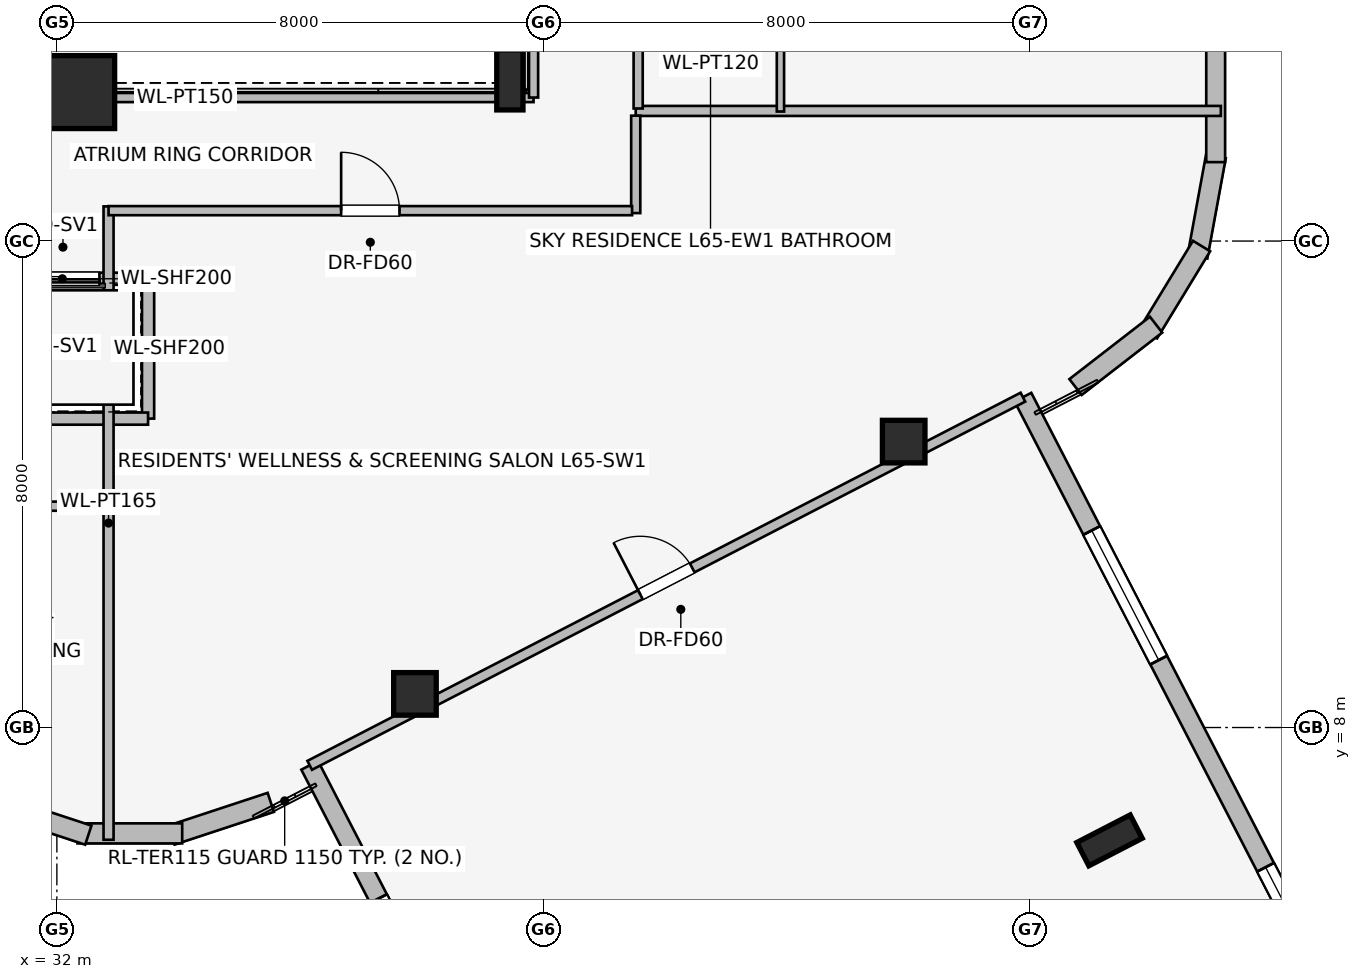
"""IFC4 building model, lengths in metres.
Left out: names, types, materials, properties, quantities, classifications, styles, units other than length and angle.
Written with IfcOpenShell. Run it as: python <this file> out.ifc"""

import sys

from ifc_helpers import new_model, si_unit, direction, frame, frame_2d, origin, origin_2d, place, context, subcontext, project, spatial, rectangle, i_section, extrude, element, fill, save


model = new_model("IFC4")
c1 = context("Model", 3, precision=1e-05, world=origin(), true_north=direction((0.0, 1.0)))
c2 = subcontext(c1, "Body", "Model", "MODEL_VIEW")
j1 = project(units=[si_unit("LENGTHUNIT", "METRE"), si_unit("PLANEANGLEUNIT", "RADIAN")], contexts=[c1])
p1 = place(None, origin())
s1 = spatial("IfcSite", under=j1, at=p1, CompositionType="ELEMENT")
p2 = place(p1, origin())
s2 = spatial("IfcBuilding", under=s1, at=p2, CompositionType="ELEMENT")
p3 = place(p2, frame((0.0, 0.0, 238.35)))
s3 = spatial("IfcBuildingStorey", under=s2, at=p3, CompositionType="ELEMENT", Elevation=238.35)
p4 = place(p3, frame((32.35, 18.45, 0.0), z_axis=(0.0, 0.0, 1.0), x_axis=(1.0, 0.0, 0.0)))
e1 = element("IfcColumn", 1, at=p4, inside=s3, PredefinedType="COLUMN", context=c2, shape_type="SweptSolid", body=[
    extrude(rectangle(XDim=1.2, YDim=1.2, at=origin_2d()), origin(), (0.0, 0.0, 1.0), 3.55),
])
for number, where, z_axis, x_axis in (
    (2, (37.889, 8.553, 0.0), (0.0, 0.0, 1.0), (1.0, 0.0, 0.0)),
    (3, (45.927, 12.702, 0.0), (0.0, 0.0, 1.0), (1.0, 0.0, 0.0)),
):
    element("IfcColumn", number, at=place(p3, frame(where, z_axis=z_axis, x_axis=x_axis)), inside=s3, PredefinedType="COLUMN", context=c2, shape_type="SweptSolid", body=[
        extrude(rectangle(XDim=0.7, YDim=0.7, at=origin_2d()), origin(), (0.0, 0.0, 1.0), 3.55),
    ])
for number, where, z_axis, x_axis in (
    (4, (39.45, 18.65, 0.0), (0.0, 0.0, 1.0), (1.0, 0.0, 0.0)),
    (5, (49.312, 6.144, 0.0), (0.0, 0.0, 1.0), (0.459, -0.889, 0.0)),
):
    element("IfcColumn", number, at=place(p3, frame(where, z_axis=z_axis, x_axis=x_axis)), inside=s3, PredefinedType="COLUMN", context=c2, shape_type="SweptSolid", body=[
        extrude(i_section(OverallWidth=0.431, OverallDepth=0.987, WebThickness=0.034, FlangeThickness=0.062, at=origin_2d()), origin(), (0.0, 0.0, 1.0), 3.55),
    ])
p5 = place(p3, frame((35.518, 6.769, 0.0), z_axis=(0.0, 0.0, 1.0), x_axis=(-0.949713440491, -0.313120393699, 0.0)))
e6 = element("IfcWall", 6, at=p5, inside=s3, PredefinedType="STANDARD", context=c2, shape_type="SweptSolid", body=[
    extrude(rectangle(XDim=1.722, YDim=0.33, at=frame_2d((0.861, 0.0))), origin(), (0.0, 0.0, 1.0), 3.26),
])
p6 = place(p3, frame((34.061, 6.259, 0.0), z_axis=(0.0, 0.0, 1.0), x_axis=(-1.0, 0.0, 0.0)))
e7 = element("IfcWall", 7, at=p6, inside=s3, PredefinedType="STANDARD", context=c2, shape_type="SweptSolid", body=[
    extrude(rectangle(XDim=1.722, YDim=0.33, at=frame_2d((0.861, 0.0))), origin(), (0.0, 0.0, 1.0), 3.26),
])
p7 = place(p3, frame((32.517, 6.23, 0.0), z_axis=(0.0, 0.0, 1.0), x_axis=(-0.949713440491, 0.313120393699, 0.0)))
e8 = element("IfcWall", 8, at=p7, inside=s3, PredefinedType="STANDARD", context=c2, shape_type="SweptSolid", body=[
    extrude(rectangle(XDim=1.722, YDim=0.33, at=frame_2d((0.861, 0.0))), origin(), (0.0, 0.0, 1.0), 3.26),
])
p8 = place(p3, frame((45.241, -10.216, 0.0), z_axis=(0.0, 0.0, 1.0), x_axis=(-0.45873211625, 0.888574614493, 0.0)))
e9 = element("IfcWall", 9, at=p8, inside=s3, PredefinedType="STANDARD", context=c2, shape_type="SweptSolid", body=[
    extrude(rectangle(XDim=19.8, YDim=0.31, at=frame_2d((9.9, 0.0))), origin(), (0.0, 0.0, 1.0), 3.26),
])
p9 = place(p8, frame((2.467, 0.0, 0.75)))
e10 = element("IfcOpeningElement", 10, at=p9, cuts=e9, PredefinedType="OPENING", context=c2, shape_type="SweptSolid", body=[
    extrude(rectangle(XDim=2.4, YDim=1.6, at=frame_2d((1.2, 0.8))), frame((0.0, 0.165, 0.0), z_axis=(0.0, -1.0, 0.0), x_axis=(1.0, 0.0, 0.0)), (0.0, 0.0, 1.0), 0.33),
])
p10 = place(p8, frame((8.7, 0.0, 0.75)))
e11 = element("IfcOpeningElement", 11, at=p10, cuts=e9, PredefinedType="OPENING", context=c2, shape_type="SweptSolid", body=[
    extrude(rectangle(XDim=2.4, YDim=1.6, at=frame_2d((1.2, 0.8))), frame((0.0, 0.165, 0.0), z_axis=(0.0, -1.0, 0.0), x_axis=(1.0, 0.0, 0.0)), (0.0, 0.0, 1.0), 0.33),
])
p11 = place(p8, frame((14.934, 0.0, 0.75)))
e12 = element("IfcOpeningElement", 12, at=p11, cuts=e9, PredefinedType="OPENING", context=c2, shape_type="SweptSolid", body=[
    extrude(rectangle(XDim=2.4, YDim=1.6, at=frame_2d((1.2, 0.8))), frame((0.0, 0.165, 0.0), z_axis=(0.0, -1.0, 0.0), x_axis=(1.0, 0.0, 0.0)), (0.0, 0.0, 1.0), 0.33),
])
p12 = place(p3, frame((47.888, 13.433, 0.0), z_axis=(0.0, 0.0, 1.0), x_axis=(0.458693173014, -0.888594718097, 0.0)))
e13 = element("IfcWall", 13, at=p12, inside=s3, PredefinedType="STANDARD", context=c2, shape_type="SweptSolid", body=[
    extrude(rectangle(XDim=19.8, YDim=0.31, at=frame_2d((9.9, 0.0))), origin(), (0.0, 0.0, 1.0), 3.26),
])
p13 = place(p12, frame((2.467, 0.0, 0.75)))
e14 = element("IfcOpeningElement", 14, at=p13, cuts=e13, PredefinedType="OPENING", context=c2, shape_type="SweptSolid", body=[
    extrude(rectangle(XDim=2.4, YDim=1.6, at=frame_2d((1.2, 0.8))), frame((0.0, 0.165, 0.0), z_axis=(0.0, -1.0, 0.0), x_axis=(1.0, 0.0, 0.0)), (0.0, 0.0, 1.0), 0.33),
])
p14 = place(p12, frame((8.7, 0.0, 0.75)))
e15 = element("IfcOpeningElement", 15, at=p14, cuts=e13, PredefinedType="OPENING", context=c2, shape_type="SweptSolid", body=[
    extrude(rectangle(XDim=2.4, YDim=1.6, at=frame_2d((1.2, 0.8))), frame((0.0, 0.165, 0.0), z_axis=(0.0, -1.0, 0.0), x_axis=(1.0, 0.0, 0.0)), (0.0, 0.0, 1.0), 0.33),
])
p15 = place(p12, frame((14.933, 0.0, 0.75)))
e16 = element("IfcOpeningElement", 16, at=p15, cuts=e13, PredefinedType="OPENING", context=c2, shape_type="SweptSolid", body=[
    extrude(rectangle(XDim=2.4, YDim=1.6, at=frame_2d((1.2, 0.8))), frame((0.0, 0.165, 0.0), z_axis=(0.0, -1.0, 0.0), x_axis=(1.0, 0.0, 0.0)), (0.0, 0.0, 1.0), 0.33),
])
p16 = place(p3, frame((51.062, 17.392, 0.0), z_axis=(0.0, 0.0, 1.0), x_axis=(-0.180691763044, -0.983539773862, 0.0)))
e17 = element("IfcWall", 17, at=p16, inside=s3, PredefinedType="STANDARD", context=c2, shape_type="SweptSolid", body=[
    extrude(rectangle(XDim=1.677, YDim=0.33, at=frame_2d((0.838, 0.0))), origin(), (0.0, 0.0, 1.0), 3.26),
])
p17 = place(p3, frame((50.826, 15.918, 0.0), z_axis=(0.0, 0.0, 1.0), x_axis=(-0.520325409202, -0.853968072318, 0.0)))
e18 = element("IfcWall", 18, at=p17, inside=s3, PredefinedType="STANDARD", context=c2, shape_type="SweptSolid", body=[
    extrude(rectangle(XDim=1.678, YDim=0.33, at=frame_2d((0.839, 0.0))), origin(), (0.0, 0.0, 1.0), 3.26),
])
p18 = place(p3, frame((50.078, 14.625, 0.0), z_axis=(0.0, 0.0, 1.0), x_axis=(-0.790691856293, -0.61221433207, 0.0)))
e19 = element("IfcWall", 19, at=p18, inside=s3, PredefinedType="STANDARD", context=c2, shape_type="SweptSolid", body=[
    extrude(rectangle(XDim=1.676, YDim=0.33, at=frame_2d((0.838, 0.0))), origin(), (0.0, 0.0, 1.0), 3.26),
])
p19 = place(p3, frame((51.058, 30.702, 0.0), z_axis=(0.0, 0.0, 1.0), x_axis=(0.0, -1.0, 0.0)))
e20 = element("IfcWall", 20, at=p19, inside=s3, PredefinedType="STANDARD", context=c2, shape_type="SweptSolid", body=[
    extrude(rectangle(XDim=13.404, YDim=0.31, at=frame_2d((6.702, 0.0))), origin(), (0.0, 0.0, 1.0), 3.26),
])
p20 = place(p19, frame((3.547, 0.0, 0.75)))
e21 = element("IfcOpeningElement", 21, at=p20, cuts=e20, PredefinedType="OPENING", context=c2, shape_type="SweptSolid", body=[
    extrude(rectangle(XDim=1.05, YDim=1.4, at=frame_2d((0.525, 0.7))), frame((0.0, 0.165, 0.0), z_axis=(0.0, -1.0, 0.0), x_axis=(1.0, 0.0, 0.0)), (0.0, 0.0, 1.0), 0.33),
])
p21 = place(p19, frame((6.26, 0.0, 0.75)))
e22 = element("IfcOpeningElement", 22, at=p21, cuts=e20, PredefinedType="OPENING", context=c2, shape_type="SweptSolid", body=[
    extrude(rectangle(XDim=1.05, YDim=1.4, at=frame_2d((0.525, 0.7))), frame((0.0, 0.165, 0.0), z_axis=(0.0, -1.0, 0.0), x_axis=(1.0, 0.0, 0.0)), (0.0, 0.0, 1.0), 0.33),
])
p22 = place(p19, frame((8.868, 0.0, 0.75)))
e23 = element("IfcOpeningElement", 23, at=p22, cuts=e20, PredefinedType="OPENING", context=c2, shape_type="SweptSolid", body=[
    extrude(rectangle(XDim=1.05, YDim=1.4, at=frame_2d((0.525, 0.7))), frame((0.0, 0.165, 0.0), z_axis=(0.0, -1.0, 0.0), x_axis=(1.0, 0.0, 0.0)), (0.0, 0.0, 1.0), 0.33),
])
p23 = place(p3, frame((33.5, 15.38, 0.0), z_axis=(0.0, 0.0, 1.0), x_axis=(-1.0, 0.0, 0.0)))
e24 = element("IfcWall", 24, at=p23, inside=s3, PredefinedType="PARTITIONING", context=c2, shape_type="SweptSolid", body=[
    extrude(rectangle(XDim=2.82, YDim=0.2, at=frame_2d((1.41, 0.0))), origin(), (0.0, 0.0, 1.0), 3.26),
])
p24 = place(p23, frame((0.8, 0.0, 0.0)))
e25 = element("IfcOpeningElement", 25, at=p24, cuts=e24, PredefinedType="OPENING", context=c2, shape_type="SweptSolid", body=[
    extrude(rectangle(XDim=1.2, YDim=2.2, at=frame_2d((0.6, 1.1))), frame((0.0, 0.11, 0.0), z_axis=(0.0, -1.0, 0.0), x_axis=(1.0, 0.0, 0.0)), (0.0, 0.0, 1.0), 0.22),
])
p25 = place(p3, frame((33.5, 13.08, 0.0), z_axis=(0.0, 0.0, 1.0), x_axis=(0.0, 1.0, 0.0)))
e26 = element("IfcWall", 26, at=p25, inside=s3, PredefinedType="PARTITIONING", context=c2, shape_type="SweptSolid", body=[
    extrude(rectangle(XDim=2.3, YDim=0.2, at=frame_2d((1.15, 0.0))), origin(), (0.0, 0.0, 1.0), 3.26),
])
p26 = place(p3, frame((30.879, 13.08, 0.0), z_axis=(0.0, 0.0, 1.0), x_axis=(1.0, 0.0, 0.0)))
e27 = element("IfcWall", 27, at=p26, inside=s3, PredefinedType="PARTITIONING", context=c2, shape_type="SweptSolid", body=[
    extrude(rectangle(XDim=2.621, YDim=0.2, at=frame_2d((1.311, 0.0))), origin(), (0.0, 0.0, 1.0), 3.26),
])
p27 = place(p3, frame((27.675, 18.36, 0.0), z_axis=(0.0, 0.0, 1.0), x_axis=(1.0, 0.0, 0.0)))
e28 = element("IfcWall", 28, at=p27, inside=s3, PredefinedType="PARTITIONING", context=c2, shape_type="SweptSolid", body=[
    extrude(rectangle(XDim=12.165, YDim=0.15, at=frame_2d((6.083, 0.0))), origin(), (0.0, 0.0, 1.0), 2.401),
])
p28 = place(p3, frame((39.84, 18.36, 0.0), z_axis=(0.0, 0.0, 1.0), x_axis=(0.0, 1.0, 0.0)))
e29 = element("IfcWall", 29, at=p28, inside=s3, PredefinedType="PARTITIONING", context=c2, shape_type="SweptSolid", body=[
    extrude(rectangle(XDim=11.28, YDim=0.15, at=frame_2d((5.64, 0.0))), origin(), (0.0, 0.0, 1.0), 3.26),
])
p29 = place(p3, frame((32.85, 6.154, 0.0), z_axis=(0.0, 0.0, 1.0), x_axis=(0.0, 1.0, 0.0)))
e30 = element("IfcWall", 30, at=p29, inside=s3, PredefinedType="PARTITIONING", context=c2, shape_type="SweptSolid", body=[
    extrude(rectangle(XDim=10.416, YDim=0.165, at=frame_2d((5.208, 0.0))), origin(), (0.0, 0.0, 1.0), 3.26),
])
p30 = place(p3, frame((21.244, 11.64, 0.0), z_axis=(0.0, 0.0, 1.0), x_axis=(1.0, 0.0, 0.0)))
e31 = element("IfcWall", 31, at=p30, inside=s3, PredefinedType="PARTITIONING", context=c2, shape_type="SweptSolid", body=[
    extrude(rectangle(XDim=11.606, YDim=0.15, at=frame_2d((5.803, 0.0))), origin(), (0.0, 0.0, 1.0), 3.26),
])
p31 = place(p30, frame((4.856, 0.0, 0.0)))
e32 = element("IfcOpeningElement", 32, at=p31, cuts=e31, PredefinedType="OPENING", context=c2, shape_type="SweptSolid", body=[
    extrude(rectangle(XDim=0.9, YDim=2.0, at=frame_2d((0.45, 1.0))), frame((0.0, 0.085, 0.0), z_axis=(0.0, -1.0, 0.0), x_axis=(1.0, 0.0, 0.0)), (0.0, 0.0, 1.0), 0.17),
])
p32 = place(p30, frame((8.306, 0.0, 0.0)))
e33 = element("IfcOpeningElement", 33, at=p32, cuts=e31, PredefinedType="OPENING", context=c2, shape_type="SweptSolid", body=[
    extrude(rectangle(XDim=0.9, YDim=2.0, at=frame_2d((0.45, 1.0))), frame((0.0, 0.085, 0.0), z_axis=(0.0, -1.0, 0.0), x_axis=(1.0, 0.0, 0.0)), (0.0, 0.0, 1.0), 0.17),
])
p33 = place(p3, frame((41.52, 18.14, 0.0), z_axis=(0.0, 0.0, 1.0), x_axis=(1.0, 0.0, 0.0)))
e34 = element("IfcWall", 34, at=p33, inside=s3, PredefinedType="PARTITIONING", context=c2, shape_type="SweptSolid", body=[
    extrude(rectangle(XDim=9.623, YDim=0.165, at=frame_2d((4.812, 0.0))), origin(), (0.0, 0.0, 1.0), 3.26),
])
p34 = place(p3, frame((43.9, 18.13, 0.0), z_axis=(0.0, 0.0, 1.0), x_axis=(0.0, 1.0, 0.0)))
e35 = element("IfcWall", 35, at=p34, inside=s3, PredefinedType="PARTITIONING", context=c2, shape_type="SweptSolid", body=[
    extrude(rectangle(XDim=4.389, YDim=0.12, at=frame_2d((2.195, 0.0))), origin(), (0.0, 0.0, 1.0), 3.26),
])
p35 = place(p3, frame((41.56, 18.18, 0.0), z_axis=(0.0, 0.0, 1.0), x_axis=(0.0, 1.0, 0.0)))
e36 = element("IfcWall", 36, at=p35, inside=s3, PredefinedType="PARTITIONING", context=c2, shape_type="SweptSolid", body=[
    extrude(rectangle(XDim=7.199, YDim=0.15, at=frame_2d((3.6, 0.0))), origin(), (0.0, 0.0, 1.0), 3.26),
])
p36 = place(p35, frame((4.37, 0.0, 0.0)))
e37 = element("IfcOpeningElement", 37, at=p36, cuts=e36, PredefinedType="OPENING", context=c2, shape_type="SweptSolid", body=[
    extrude(rectangle(XDim=0.96, YDim=2.0, at=frame_2d((0.48, 1.0))), frame((0.0, 0.085, 0.0), z_axis=(0.0, -1.0, 0.0), x_axis=(1.0, 0.0, 0.0)), (0.0, 0.0, 1.0), 0.17),
])
p37 = place(p3, frame((41.52, 16.46, 0.0), z_axis=(0.0, 0.0, 1.0), x_axis=(0.0, 1.0, 0.0)))
e38 = element("IfcWall", 38, at=p37, inside=s3, PredefinedType="PARTITIONING", context=c2, shape_type="SweptSolid", body=[
    extrude(rectangle(XDim=1.602, YDim=0.15, at=frame_2d((0.801, 0.0))), origin(), (0.0, 0.0, 1.0), 3.26),
])
p38 = place(p3, frame((32.85, 16.5, 0.0), z_axis=(0.0, 0.0, 1.0), x_axis=(1.0, 0.0, 0.0)))
e39 = element("IfcWall", 39, at=p38, inside=s3, PredefinedType="PARTITIONING", context=c2, shape_type="SweptSolid", body=[
    extrude(rectangle(XDim=8.61, YDim=0.15, at=frame_2d((4.305, 0.0))), origin(), (0.0, 0.0, 1.0), 3.26),
])
p39 = place(p38, frame((3.825, 0.0, 0.0)))
e40 = element("IfcOpeningElement", 40, at=p39, cuts=e39, PredefinedType="OPENING", context=c2, shape_type="SweptSolid", body=[
    extrude(rectangle(XDim=0.96, YDim=2.0, at=frame_2d((0.48, 1.0))), frame((0.0, 0.085, 0.0), z_axis=(0.0, -1.0, 0.0), x_axis=(1.0, 0.0, 0.0)), (0.0, 0.0, 1.0), 0.17),
])
p40 = place(p3, frame((36.158, 7.378, 0.0), z_axis=(0.0, 0.0, 1.0), x_axis=(0.88859001822, 0.458702277648, 0.0)))
e41 = element("IfcWall", 41, at=p40, inside=s3, PredefinedType="PARTITIONING", context=c2, shape_type="SweptSolid", body=[
    extrude(rectangle(XDim=13.201, YDim=0.165, at=frame_2d((6.6, 0.0))), origin(), (0.0, 0.0, 1.0), 2.711),
])
p41 = place(p40, frame((6.12, 0.0, 0.0)))
e42 = element("IfcOpeningElement", 42, at=p41, cuts=e41, PredefinedType="OPENING", context=c2, shape_type="SweptSolid", body=[
    extrude(rectangle(XDim=0.96, YDim=2.0, at=frame_2d((0.48, 1.0))), frame((0.0, 0.093, 0.0), z_axis=(0.0, -1.0, 0.0), x_axis=(1.0, 0.0, 0.0)), (0.0, 0.0, 1.0), 0.185),
])
p42 = place(p11, origin())
e43 = element("IfcWindow", 43, at=p42, inside=s3, PartitioningType="SINGLE_PANEL", PredefinedType="WINDOW", context=c2, shape_type="SweptSolid", body=[
    extrude(rectangle(XDim=2.4, YDim=1.6, at=frame_2d((1.2, 0.8))), frame((0.0, 0.03, 0.0), z_axis=(0.0, -1.0, 0.0), x_axis=(1.0, 0.0, 0.0)), (0.0, 0.0, 1.0), 0.06),
])
fill(e12, e43)
p43 = place(p13, origin())
e44 = element("IfcWindow", 44, at=p43, inside=s3, PartitioningType="SINGLE_PANEL", PredefinedType="WINDOW", context=c2, shape_type="SweptSolid", body=[
    extrude(rectangle(XDim=2.4, YDim=1.6, at=frame_2d((1.2, 0.8))), frame((0.0, 0.03, 0.0), z_axis=(0.0, -1.0, 0.0), x_axis=(1.0, 0.0, 0.0)), (0.0, 0.0, 1.0), 0.06),
])
fill(e14, e44)
p44 = place(p14, origin())
e45 = element("IfcWindow", 45, at=p44, inside=s3, PartitioningType="SINGLE_PANEL", PredefinedType="WINDOW", context=c2, shape_type="SweptSolid", body=[
    extrude(rectangle(XDim=2.4, YDim=1.6, at=frame_2d((1.2, 0.8))), frame((0.0, 0.03, 0.0), z_axis=(0.0, -1.0, 0.0), x_axis=(1.0, 0.0, 0.0)), (0.0, 0.0, 1.0), 0.06),
])
fill(e15, e45)
p45 = place(p24, origin())
e46 = element("IfcDoor", 46, at=p45, inside=s3, OperationType="SLIDING_TO_RIGHT", PredefinedType="DOOR", context=c2, shape_type="SweptSolid", body=[
    extrude(rectangle(XDim=1.2, YDim=2.2, at=frame_2d((0.6, 1.1))), frame((0.0, 0.025, 0.0), z_axis=(0.0, -1.0, 0.0), x_axis=(1.0, 0.0, 0.0)), (0.0, 0.0, 1.0), 0.05),
])
fill(e25, e46)
p46 = place(p39, origin())
e47 = element("IfcDoor", 47, at=p46, inside=s3, OperationType="SINGLE_SWING_LEFT", PredefinedType="DOOR", context=c2, shape_type="SweptSolid", body=[
    extrude(rectangle(XDim=0.96, YDim=2.0, at=frame_2d((0.48, 1.0))), frame((0.0, 0.025, 0.0), z_axis=(0.0, -1.0, 0.0), x_axis=(1.0, 0.0, 0.0)), (0.0, 0.0, 1.0), 0.05),
])
fill(e40, e47)
p47 = place(p41, origin())
e48 = element("IfcDoor", 48, at=p47, inside=s3, OperationType="SINGLE_SWING_LEFT", PredefinedType="DOOR", context=c2, shape_type="SweptSolid", body=[
    extrude(rectangle(XDim=0.96, YDim=2.0, at=frame_2d((0.48, 1.0))), frame((0.0, 0.025, 0.0), z_axis=(0.0, -1.0, 0.0), x_axis=(1.0, 0.0, 0.0)), (0.0, 0.0, 1.0), 0.05),
])
fill(e42, e48)
save(model, sys.argv[1])
